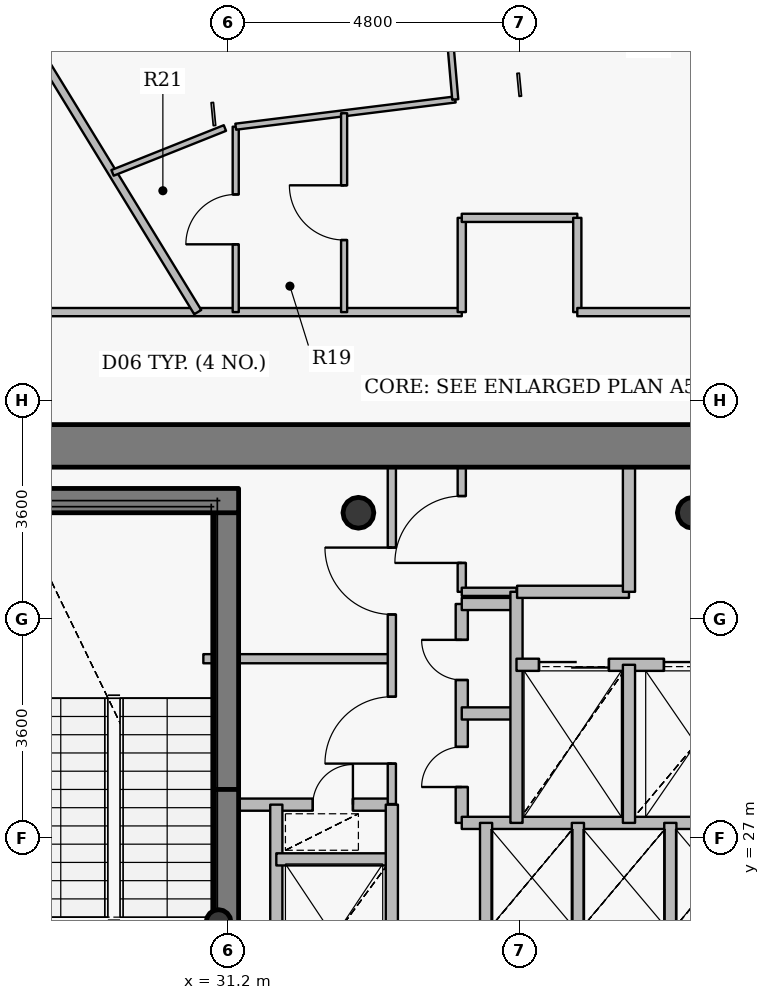
"""IFC4 building model, lengths in metres.
Left out: names, types, materials, properties, quantities, classifications, styles, units other than length and angle.
Written with IfcOpenShell. Run it as: python <this file> out.ifc"""

import sys

from ifc_helpers import new_model, si_unit, direction, frame, frame_2d, origin, origin_2d, place, context, subcontext, project, spatial, rectangle, hollow_circle, extrude, source, transform, mapped, element, fill, save


model = new_model("IFC4")
c1 = context("Model", 3, precision=1e-05, world=origin(), true_north=direction((0.0, 1.0)))
c2 = subcontext(c1, "Body", "Model", "MODEL_VIEW")
j1 = project(units=[si_unit("LENGTHUNIT", "METRE"), si_unit("PLANEANGLEUNIT", "RADIAN")], contexts=[c1])
p1 = place(None, origin())
s1 = spatial("IfcSite", under=j1, at=p1, CompositionType="ELEMENT")
p2 = place(p1, origin())
s2 = spatial("IfcBuilding", under=s1, at=p2, CompositionType="ELEMENT")
p3 = place(p2, frame((0.0, 0.0, 288.0)))
s3 = spatial("IfcBuildingStorey", under=s2, at=p3, CompositionType="ELEMENT", Elevation=288.0)
for number, where, z_axis, x_axis in (
    (1, (38.85, 32.35, 0.0), (0.0, 0.0, 1.0), (1.0, 0.0, 0.0)),
    (2, (33.35, 32.35, 0.0), (0.0, 0.0, 1.0), (1.0, 0.0, 0.0)),
):
    element("IfcColumn", number, at=place(p3, frame(where, z_axis=z_axis, x_axis=x_axis)), inside=s3, PredefinedType="COLUMN", context=c2, shape_type="SweptSolid", body=[
        extrude(hollow_circle(Radius=0.254, WallThickness=0.02, at=origin_2d()), origin(), (0.0, 0.0, 1.0), 3.75),
    ])
p4 = place(p3, frame((31.18, 27.8, 0.0), z_axis=(0.0, 0.0, 1.0), x_axis=(0.0, 1.0, 0.0)))
e3 = element("IfcWall", 3, at=p4, inside=s3, PredefinedType="SHEAR", context=c2, shape_type="SweptSolid", body=[
    extrude(rectangle(XDim=4.75, YDim=0.4, at=frame_2d((2.375, 0.0))), origin(), (0.0, 0.0, 1.0), 3.75),
])
p5 = place(p3, frame((27.25, 32.55, 0.0), z_axis=(0.0, 0.0, 1.0), x_axis=(1.0, 0.0, 0.0)))
e4 = element("IfcWall", 4, at=p5, inside=s3, PredefinedType="SHEAR", context=c2, shape_type="SweptSolid", body=[
    extrude(rectangle(XDim=4.13, YDim=0.4, at=frame_2d((2.065, 0.0))), origin(), (0.0, 0.0, 1.0), 3.75),
])
p6 = place(p3, frame((31.05, 25.62, 0.0), z_axis=(0.0, 0.0, 1.0), x_axis=(1.0, 0.0, 0.0)))
e5 = element("IfcColumn", 5, at=p6, inside=s3, PredefinedType="COLUMN", context=c2, shape_type="SweptSolid", body=[
    extrude(hollow_circle(Radius=0.203, WallThickness=0.016, at=origin_2d()), origin(), (0.0, 0.0, 1.0), 3.75),
])
p7 = place(p3, frame((27.65, 33.45, 0.0), z_axis=(0.0, 0.0, 1.0), x_axis=(1.0, 0.0, 0.0)))
e6 = element("IfcWall", 6, at=p7, inside=s3, PredefinedType="SHEAR", context=c2, shape_type="SweptSolid", body=[
    extrude(rectangle(XDim=16.7, YDim=0.7, at=frame_2d((8.35, 0.0))), origin(), (0.0, 0.0, 1.0), 3.05),
])
p8 = place(p7, frame((12.775, 0.0, 0.0)))
e7 = element("IfcOpeningElement", 7, at=p8, cuts=e6, PredefinedType="OPENING", context=c2, shape_type="SweptSolid", body=[
    extrude(rectangle(XDim=1.15, YDim=2.15, at=origin_2d()), frame((0.575, 0.36, 1.075), z_axis=(0.0, -1.0, 0.0), x_axis=(1.0, 0.0, 0.0)), (0.0, 0.0, 1.0), 0.72),
])
p9 = place(p3, frame((31.18, 25.55, 0.0), z_axis=(0.0, 0.0, 1.0), x_axis=(0.0, 1.0, 0.0)))
e8 = element("IfcWall", 8, at=p9, inside=s3, PredefinedType="SHEAR", context=c2, shape_type="SweptSolid", body=[
    extrude(rectangle(XDim=2.25, YDim=0.4, at=frame_2d((1.125, 0.0))), origin(), (0.0, 0.0, 1.0), 3.1),
])
p10 = place(p3, frame((24.95, 35.65, 0.0), z_axis=(0.0, 0.0, 1.0), x_axis=(1.0, 0.0, 0.0)))
e9 = element("IfcWall", 9, at=p10, inside=s3, PredefinedType="PARTITIONING", context=c2, shape_type="SweptSolid", body=[
    extrude(rectangle(XDim=10.1, YDim=0.135, at=frame_2d((5.05, 0.0))), origin(), (0.0, 0.0, 1.0), 3.035),
])
p11 = place(p3, frame((26.402, 42.688, 0.0), z_axis=(0.0, 0.0, 1.0), x_axis=(0.521891606098, -0.853011812043, 0.0)))
e10 = element("IfcWall", 10, at=p11, inside=s3, PredefinedType="PARTITIONING", context=c2, shape_type="SweptSolid", body=[
    extrude(rectangle(XDim=8.25, YDim=0.135, at=frame_2d((4.125, 0.0))), origin(), (0.0, 0.0, 1.0), 2.985),
])
p12 = place(p3, frame((29.307, 37.94, 0.0), z_axis=(0.0, 0.0, 1.0), x_axis=(0.928797929692, 0.370586569913, 0.0)))
e11 = element("IfcWall", 11, at=p12, inside=s3, PredefinedType="PARTITIONING", context=c2, shape_type="SweptSolid", body=[
    extrude(rectangle(XDim=1.99, YDim=0.1, at=frame_2d((0.995, 0.0))), origin(), (0.0, 0.0, 1.0), 3.035),
])
p13 = place(p3, frame((30.8, 29.95, 0.0), z_axis=(0.0, 0.0, 1.0), x_axis=(1.0, 0.0, 0.0)))
e12 = element("IfcWall", 12, at=p13, inside=s3, PredefinedType="PARTITIONING", context=c2, shape_type="SweptSolid", body=[
    extrude(rectangle(XDim=3.1, YDim=0.15, at=frame_2d((1.55, 0.0))), origin(), (0.0, 0.0, 1.0), 3.085),
])
p14 = place(p3, frame((31.1, 27.55, 0.0), z_axis=(0.0, 0.0, 1.0), x_axis=(1.0, 0.0, 0.0)))
e13 = element("IfcWall", 13, at=p14, inside=s3, PredefinedType="PARTITIONING", context=c2, shape_type="SweptSolid", body=[
    extrude(rectangle(XDim=2.8, YDim=0.2, at=frame_2d((1.4, 0.0))), origin(), (0.0, 0.0, 1.0), 3.085),
])
p15 = place(p14, frame((1.5, 0.0, 0.0)))
e14 = element("IfcOpeningElement", 14, at=p15, cuts=e13, PredefinedType="OPENING", context=c2, shape_type="SweptSolid", body=[
    extrude(rectangle(XDim=0.66, YDim=2.05, at=origin_2d()), frame((0.33, 0.11, 1.025), z_axis=(0.0, -1.0, 0.0), x_axis=(1.0, 0.0, 0.0)), (0.0, 0.0, 1.0), 0.22),
])
p16 = place(p3, frame((31.333, 35.65, 0.0), z_axis=(0.0, 0.0, 1.0), x_axis=(0.0, 1.0, 0.0)))
e15 = element("IfcWall", 15, at=p16, inside=s3, PredefinedType="PARTITIONING", context=c2, shape_type="SweptSolid", body=[
    extrude(rectangle(XDim=3.049, YDim=0.1, at=frame_2d((1.525, 0.0))), origin(), (0.0, 0.0, 1.0), 3.035),
])
p17 = place(p16, frame((1.115, 0.0, 0.0)))
e16 = element("IfcOpeningElement", 16, at=p17, cuts=e15, PredefinedType="OPENING", context=c2, shape_type="SweptSolid", body=[
    extrude(rectangle(XDim=0.82, YDim=2.1, at=origin_2d()), frame((0.41, 0.06, 1.05), z_axis=(0.0, -1.0, 0.0), x_axis=(1.0, 0.0, 0.0)), (0.0, 0.0, 1.0), 0.12),
])
p18 = place(p3, frame((31.333, 38.699, 0.0), z_axis=(0.0, 0.0, 1.0), x_axis=(0.992398193069, 0.123068380965, 0.0)))
e17 = element("IfcWall", 17, at=p18, inside=s3, PredefinedType="PARTITIONING", context=c2, shape_type="SweptSolid", body=[
    extrude(rectangle(XDim=3.638, YDim=0.1, at=frame_2d((1.819, 0.0))), origin(), (0.0, 0.0, 1.0), 2.985),
])
p19 = place(p3, frame((32.0, 24.1, 0.0), z_axis=(0.0, 0.0, 1.0), x_axis=(0.0, 1.0, 0.0)))
e18 = element("IfcWall", 18, at=p19, inside=s3, PredefinedType="PARTITIONING", context=c2, shape_type="SweptSolid", body=[
    extrude(rectangle(XDim=3.45, YDim=0.2, at=frame_2d((1.725, 0.0))), origin(), (0.0, 0.0, 1.0), 3.5),
])
p20 = place(p3, frame((32.0, 26.65, 0.0), z_axis=(0.0, 0.0, 1.0), x_axis=(1.0, 0.0, 0.0)))
e19 = element("IfcWall", 19, at=p20, inside=s3, PredefinedType="PARTITIONING", context=c2, shape_type="SweptSolid", body=[
    extrude(rectangle(XDim=1.9, YDim=0.2, at=frame_2d((0.95, 0.0))), origin(), (0.0, 0.0, 1.0), 3.085),
])
p21 = place(p3, frame((33.115, 35.65, 0.0), z_axis=(0.0, 0.0, 1.0), x_axis=(0.0, 1.0, 0.0)))
e20 = element("IfcWall", 20, at=p21, inside=s3, PredefinedType="PARTITIONING", context=c2, shape_type="SweptSolid", body=[
    extrude(rectangle(XDim=3.27, YDim=0.1, at=frame_2d((1.635, 0.0))), origin(), (0.0, 0.0, 1.0), 3.5),
])
p22 = place(p21, frame((1.185, 0.0, 0.0)))
e21 = element("IfcOpeningElement", 21, at=p22, cuts=e20, PredefinedType="OPENING", context=c2, shape_type="SweptSolid", body=[
    extrude(rectangle(XDim=0.9, YDim=2.1, at=origin_2d()), frame((0.45, 0.06, 1.05), z_axis=(0.0, -1.0, 0.0), x_axis=(1.0, 0.0, 0.0)), (0.0, 0.0, 1.0), 0.12),
])
p23 = place(p3, frame((33.9, 20.9, 0.0), z_axis=(0.0, 0.0, 1.0), x_axis=(0.0, 1.0, 0.0)))
e22 = element("IfcWall", 22, at=p23, inside=s3, PredefinedType="PARTITIONING", context=c2, shape_type="SweptSolid", body=[
    extrude(rectangle(XDim=6.65, YDim=0.2, at=frame_2d((3.325, 0.0))), origin(), (0.0, 0.0, 1.0), 3.085),
])
p24 = place(p3, frame((33.9, 27.56, 0.0), z_axis=(0.0, 0.0, 1.0), x_axis=(0.0, 1.0, 0.0)))
e23 = element("IfcWall", 23, at=p24, inside=s3, PredefinedType="PARTITIONING", context=c2, shape_type="SweptSolid", body=[
    extrude(rectangle(XDim=5.54, YDim=0.135, at=frame_2d((2.77, 0.0))), origin(), (0.0, 0.0, 1.0), 3.085),
])
p25 = place(p24, frame((0.665, 0.0, 0.0)))
e24 = element("IfcOpeningElement", 24, at=p25, cuts=e23, PredefinedType="OPENING", context=c2, shape_type="SweptSolid", body=[
    extrude(rectangle(XDim=1.1, YDim=2.15, at=origin_2d()), frame((0.55, 0.078, 1.075), z_axis=(0.0, -1.0, 0.0), x_axis=(1.0, 0.0, 0.0)), (0.0, 0.0, 1.0), 0.155),
])
p26 = place(p24, frame((3.117, 0.0, 0.0)))
e25 = element("IfcOpeningElement", 25, at=p26, cuts=e23, PredefinedType="OPENING", context=c2, shape_type="SweptSolid", body=[
    extrude(rectangle(XDim=1.1, YDim=2.15, at=origin_2d()), frame((0.55, 0.078, 1.075), z_axis=(0.0, -1.0, 0.0), x_axis=(1.0, 0.0, 0.0)), (0.0, 0.0, 1.0), 0.155),
])
p27 = place(p3, frame((34.492, 44.327, 0.0), z_axis=(0.0, 0.0, 1.0), x_axis=(0.086674190257, -0.9962367112, 0.0)))
e26 = element("IfcWall", 26, at=p27, inside=s3, PredefinedType="PARTITIONING", context=c2, shape_type="SweptSolid", body=[
    extrude(rectangle(XDim=5.2, YDim=0.1, at=frame_2d((2.6, 0.0))), origin(), (0.0, 0.0, 1.0), 2.985),
])
p28 = place(p27, frame((2.15, 0.0, 0.0)))
e27 = element("IfcOpeningElement", 27, at=p28, cuts=e26, PredefinedType="OPENING", context=c2, shape_type="SweptSolid", body=[
    extrude(rectangle(XDim=0.9, YDim=2.1, at=origin_2d()), frame((0.45, 0.06, 1.05), z_axis=(0.0, -1.0, 0.0), x_axis=(1.0, 0.0, 0.0)), (0.0, 0.0, 1.0), 0.12),
])
p29 = place(p3, frame((35.05, 27.25, 0.0), z_axis=(0.0, 0.0, 1.0), x_axis=(0.0, 1.0, 0.0)))
e28 = element("IfcWall", 28, at=p29, inside=s3, PredefinedType="PARTITIONING", context=c2, shape_type="SweptSolid", body=[
    extrude(rectangle(XDim=3.6, YDim=0.2, at=frame_2d((1.8, 0.0))), origin(), (0.0, 0.0, 1.0), 3.5),
])
p30 = place(p29, frame((0.59, 0.0, 0.0)))
e29 = element("IfcOpeningElement", 29, at=p30, cuts=e28, PredefinedType="OPENING", context=c2, shape_type="SweptSolid", body=[
    extrude(rectangle(XDim=0.66, YDim=2.05, at=origin_2d()), frame((0.33, 0.11, 1.025), z_axis=(0.0, -1.0, 0.0), x_axis=(1.0, 0.0, 0.0)), (0.0, 0.0, 1.0), 0.22),
])
p31 = place(p29, frame((2.35, 0.0, 0.0)))
e30 = element("IfcOpeningElement", 30, at=p31, cuts=e28, PredefinedType="OPENING", context=c2, shape_type="SweptSolid", body=[
    extrude(rectangle(XDim=0.66, YDim=2.05, at=origin_2d()), frame((0.33, 0.11, 1.025), z_axis=(0.0, -1.0, 0.0), x_axis=(1.0, 0.0, 0.0)), (0.0, 0.0, 1.0), 0.22),
])
p32 = place(p3, frame((35.05, 27.25, 0.0), z_axis=(0.0, 0.0, 1.0), x_axis=(1.0, 0.0, 0.0)))
e31 = element("IfcWall", 31, at=p32, inside=s3, PredefinedType="PARTITIONING", context=c2, shape_type="SweptSolid", body=[
    extrude(rectangle(XDim=4.95, YDim=0.2, at=frame_2d((2.475, 0.0))), origin(), (0.0, 0.0, 1.0), 3.085),
])
for number, where, z_axis, x_axis in (
    (32, (35.05, 29.05, 0.0), (0.0, 0.0, 1.0), (1.0, 0.0, 0.0)),
    (33, (35.05, 30.85, 0.0), (0.0, 0.0, 1.0), (1.0, 0.0, 0.0)),
):
    element("IfcWall", number, at=place(p3, frame(where, z_axis=z_axis, x_axis=x_axis)), inside=s3, PredefinedType="PARTITIONING", context=c2, shape_type="SweptSolid", body=[
        extrude(rectangle(XDim=0.9, YDim=0.2, at=frame_2d((0.45, 0.0))), origin(), (0.0, 0.0, 1.0), 3.5),
    ])
p33 = place(p3, frame((35.05, 31.05, 0.0), z_axis=(0.0, 0.0, 1.0), x_axis=(0.0, 1.0, 0.0)))
e34 = element("IfcWall", 34, at=p33, inside=s3, PredefinedType="PARTITIONING", context=c2, shape_type="SweptSolid", body=[
    extrude(rectangle(XDim=2.05, YDim=0.135, at=frame_2d((1.025, 0.0))), origin(), (0.0, 0.0, 1.0), 3.085),
])
p34 = place(p33, frame((0.475, 0.0, 0.0)))
e35 = element("IfcOpeningElement", 35, at=p34, cuts=e34, PredefinedType="OPENING", context=c2, shape_type="SweptSolid", body=[
    extrude(rectangle(XDim=1.1, YDim=2.15, at=origin_2d()), frame((0.55, 0.078, 1.075), z_axis=(0.0, -1.0, 0.0), x_axis=(1.0, 0.0, 0.0)), (0.0, 0.0, 1.0), 0.155),
])
p35 = place(p3, frame((35.05, 31.05, 0.0), z_axis=(0.0, 0.0, 1.0), x_axis=(1.0, 0.0, 0.0)))
e36 = element("IfcWall", 36, at=p35, inside=s3, PredefinedType="PARTITIONING", context=c2, shape_type="SweptSolid", body=[
    extrude(rectangle(XDim=0.9, YDim=0.135, at=frame_2d((0.45, 0.0))), origin(), (0.0, 0.0, 1.0), 3.5),
])
p36 = place(p3, frame((35.05, 35.65, 0.0), z_axis=(0.0, 0.0, 1.0), x_axis=(0.0, 1.0, 0.0)))
e37 = element("IfcWall", 37, at=p36, inside=s3, PredefinedType="PARTITIONING", context=c2, shape_type="SweptSolid", body=[
    extrude(rectangle(XDim=1.55, YDim=0.135, at=frame_2d((0.775, 0.0))), origin(), (0.0, 0.0, 1.0), 3.5),
])
p37 = place(p3, frame((35.05, 37.2, 0.0), z_axis=(0.0, 0.0, 1.0), x_axis=(1.0, 0.0, 0.0)))
e38 = element("IfcWall", 38, at=p37, inside=s3, PredefinedType="PARTITIONING", context=c2, shape_type="SweptSolid", body=[
    extrude(rectangle(XDim=1.9, YDim=0.135, at=frame_2d((0.95, 0.0))), origin(), (0.0, 0.0, 1.0), 3.035),
])
p38 = place(p3, frame((35.45, 25.45, 0.0), z_axis=(0.0, 0.0, 1.0), x_axis=(0.0, 1.0, 0.0)))
e39 = element("IfcWall", 39, at=p38, inside=s3, PredefinedType="PARTITIONING", context=c2, shape_type="SweptSolid", body=[
    extrude(rectangle(XDim=1.8, YDim=0.2, at=frame_2d((0.9, 0.0))), origin(), (0.0, 0.0, 1.0), 3.5),
])
p39 = place(p3, frame((35.95, 27.25, 0.0), z_axis=(0.0, 0.0, 1.0), x_axis=(0.0, 1.0, 0.0)))
e40 = element("IfcWall", 40, at=p39, inside=s3, PredefinedType="PARTITIONING", context=c2, shape_type="SweptSolid", body=[
    extrude(rectangle(XDim=3.8, YDim=0.2, at=frame_2d((1.9, 0.0))), origin(), (0.0, 0.0, 1.0), 3.5),
])
p40 = place(p3, frame((35.95, 29.85, 0.0), z_axis=(0.0, 0.0, 1.0), x_axis=(1.0, 0.0, 0.0)))
e41 = element("IfcWall", 41, at=p40, inside=s3, PredefinedType="PARTITIONING", context=c2, shape_type="SweptSolid", body=[
    extrude(rectangle(XDim=8.49, YDim=0.2, at=frame_2d((4.245, 0.0))), origin(), (0.0, 0.0, 1.0), 3.085),
])
p41 = place(p40, frame((6.1, 0.0, 0.0)))
e42 = element("IfcOpeningElement", 42, at=p41, cuts=e41, PredefinedType="OPENING", context=c2, shape_type="SweptSolid", body=[
    extrude(rectangle(XDim=1.2, YDim=2.15, at=origin_2d()), frame((0.6, 0.11, 1.075), z_axis=(0.0, -1.0, 0.0), x_axis=(1.0, 0.0, 0.0)), (0.0, 0.0, 1.0), 0.22),
])
p42 = place(p40, frame((0.37, 0.0, 0.0)))
e43 = element("IfcOpeningElement", 43, at=p42, cuts=e41, PredefinedType="OPENING", context=c2, shape_type="SweptSolid", body=[
    extrude(rectangle(XDim=1.15, YDim=2.15, at=origin_2d()), frame((0.575, 0.11, 1.075), z_axis=(0.0, -1.0, 0.0), x_axis=(1.0, 0.0, 0.0)), (0.0, 0.0, 1.0), 0.22),
])
p43 = place(p40, frame((2.425, 0.0, 0.0)))
e44 = element("IfcOpeningElement", 44, at=p43, cuts=e41, PredefinedType="OPENING", context=c2, shape_type="SweptSolid", body=[
    extrude(rectangle(XDim=1.05, YDim=2.15, at=origin_2d()), frame((0.525, 0.11, 1.075), z_axis=(0.0, -1.0, 0.0), x_axis=(1.0, 0.0, 0.0)), (0.0, 0.0, 1.0), 0.22),
])
p44 = place(p3, frame((35.96, 31.05, 0.0), z_axis=(0.0, 0.0, 1.0), x_axis=(1.0, 0.0, 0.0)))
e45 = element("IfcWall", 45, at=p44, inside=s3, PredefinedType="PARTITIONING", context=c2, shape_type="SweptSolid", body=[
    extrude(rectangle(XDim=1.84, YDim=0.2, at=frame_2d((0.92, 0.0))), origin(), (0.0, 0.0, 1.0), 3.5),
])
p45 = place(p3, frame((36.95, 35.65, 0.0), z_axis=(0.0, 0.0, 1.0), x_axis=(0.0, 1.0, 0.0)))
e46 = element("IfcWall", 46, at=p45, inside=s3, PredefinedType="PARTITIONING", context=c2, shape_type="SweptSolid", body=[
    extrude(rectangle(XDim=1.55, YDim=0.135, at=frame_2d((0.775, 0.0))), origin(), (0.0, 0.0, 1.0), 3.5),
])
p46 = place(p3, frame((36.95, 35.65, 0.0), z_axis=(0.0, 0.0, 1.0), x_axis=(1.0, 0.0, 0.0)))
e47 = element("IfcWall", 47, at=p46, inside=s3, PredefinedType="PARTITIONING", context=c2, shape_type="SweptSolid", body=[
    extrude(rectangle(XDim=10.1, YDim=0.135, at=frame_2d((5.05, 0.0))), origin(), (0.0, 0.0, 1.0), 3.035),
])
p47 = place(p46, frame((3.848, 0.0, 0.0)))
e48 = element("IfcOpeningElement", 48, at=p47, cuts=e47, PredefinedType="OPENING", context=c2, shape_type="SweptSolid", body=[
    extrude(rectangle(XDim=1.0, YDim=2.15, at=origin_2d()), frame((0.5, 0.078, 1.075), z_axis=(0.0, -1.0, 0.0), x_axis=(1.0, 0.0, 0.0)), (0.0, 0.0, 1.0), 0.155),
])
p48 = place(p3, frame((36.96, 25.45, 0.0), z_axis=(0.0, 0.0, 1.0), x_axis=(0.0, 1.0, 0.0)))
e49 = element("IfcWall", 49, at=p48, inside=s3, PredefinedType="PARTITIONING", context=c2, shape_type="SweptSolid", body=[
    extrude(rectangle(XDim=1.8, YDim=0.2, at=frame_2d((0.9, 0.0))), origin(), (0.0, 0.0, 1.0), 3.5),
])
p49 = place(p3, frame((37.8, 27.25, 0.0), z_axis=(0.0, 0.0, 1.0), x_axis=(0.0, 1.0, 0.0)))
e50 = element("IfcWall", 50, at=p49, inside=s3, PredefinedType="PARTITIONING", context=c2, shape_type="SweptSolid", body=[
    extrude(rectangle(XDim=2.6, YDim=0.2, at=frame_2d((1.3, 0.0))), origin(), (0.0, 0.0, 1.0), 3.5),
])
p50 = place(p3, frame((37.8, 31.05, 0.0), z_axis=(0.0, 0.0, 1.0), x_axis=(0.0, 1.0, 0.0)))
e51 = element("IfcWall", 51, at=p50, inside=s3, PredefinedType="PARTITIONING", context=c2, shape_type="SweptSolid", body=[
    extrude(rectangle(XDim=2.05, YDim=0.2, at=frame_2d((1.025, 0.0))), origin(), (0.0, 0.0, 1.0), 3.085),
])
p51 = place(p3, frame((38.48, 25.45, 0.0), z_axis=(0.0, 0.0, 1.0), x_axis=(0.0, 1.0, 0.0)))
e52 = element("IfcWall", 52, at=p51, inside=s3, PredefinedType="PARTITIONING", context=c2, shape_type="SweptSolid", body=[
    extrude(rectangle(XDim=1.8, YDim=0.2, at=frame_2d((0.9, 0.0))), origin(), (0.0, 0.0, 1.0), 3.5),
])
m1 = source(origin(), c2, "Body", "SweptSolid", [
    extrude(rectangle(XDim=1.15, YDim=2.15, at=origin_2d()), frame((0.575, 0.025, 1.075), z_axis=(0.0, -1.0, 0.0), x_axis=(1.0, 0.0, 0.0)), (0.0, 0.0, 1.0), 0.05),
])
p52 = place(p42, origin())
e53 = element("IfcDoor", 53, at=p52, inside=s3, OperationType="DOUBLE_DOOR_SLIDING", PredefinedType="USERDEFINED", context=c2, shape_type="MappedRepresentation", body=[
    mapped(m1, transform((0.0, 0.0, 0.0), x_axis=(1.0, 0.0, 0.0), y_axis=(0.0, 1.0, 0.0), z_axis=(0.0, 0.0, 1.0), scale=1.0)),
])
fill(e43, e53)
m2 = source(origin(), c2, "Body", "SweptSolid", [
    extrude(rectangle(XDim=1.05, YDim=2.15, at=origin_2d()), frame((0.525, 0.025, 1.075), z_axis=(0.0, -1.0, 0.0), x_axis=(1.0, 0.0, 0.0)), (0.0, 0.0, 1.0), 0.05),
])
p53 = place(p43, origin())
e54 = element("IfcDoor", 54, at=p53, inside=s3, OperationType="DOUBLE_DOOR_SLIDING", PredefinedType="USERDEFINED", context=c2, shape_type="MappedRepresentation", body=[
    mapped(m2, transform((0.0, 0.0, 0.0), x_axis=(1.0, 0.0, 0.0), y_axis=(0.0, 1.0, 0.0), z_axis=(0.0, 0.0, 1.0), scale=1.0)),
])
fill(e44, e54)
m3 = source(origin(), c2, "Body", "SweptSolid", [
    extrude(rectangle(XDim=0.9, YDim=2.1, at=origin_2d()), frame((0.45, 0.025, 1.05), z_axis=(0.0, -1.0, 0.0), x_axis=(1.0, 0.0, 0.0)), (0.0, 0.0, 1.0), 0.05),
])
p54 = place(p22, origin())
e55 = element("IfcDoor", 55, at=p54, inside=s3, OperationType="SINGLE_SWING_RIGHT", PredefinedType="DOOR", context=c2, shape_type="MappedRepresentation", body=[
    mapped(m3, transform((0.0, 0.0, 0.0), x_axis=(1.0, 0.0, 0.0), y_axis=(0.0, 1.0, 0.0), z_axis=(0.0, 0.0, 1.0), scale=1.0)),
])
fill(e21, e55)
m4 = source(origin(), c2, "Body", "SweptSolid", [
    extrude(rectangle(XDim=0.82, YDim=2.1, at=origin_2d()), frame((0.41, 0.025, 1.05), z_axis=(0.0, -1.0, 0.0), x_axis=(1.0, 0.0, 0.0)), (0.0, 0.0, 1.0), 0.05),
])
p55 = place(p17, origin())
e56 = element("IfcDoor", 56, at=p55, inside=s3, OperationType="SINGLE_SWING_LEFT", PredefinedType="DOOR", context=c2, shape_type="MappedRepresentation", body=[
    mapped(m4, transform((0.0, 0.0, 0.0), x_axis=(1.0, 0.0, 0.0), y_axis=(0.0, 1.0, 0.0), z_axis=(0.0, 0.0, 1.0), scale=1.0)),
])
fill(e16, e56)
m5 = source(origin(), c2, "Body", "SweptSolid", [
    extrude(rectangle(XDim=0.66, YDim=2.05, at=origin_2d()), frame((0.33, 0.025, 1.025), z_axis=(0.0, -1.0, 0.0), x_axis=(1.0, 0.0, 0.0)), (0.0, 0.0, 1.0), 0.05),
])
p56 = place(p30, origin())
e57 = element("IfcDoor", 57, at=p56, inside=s3, OperationType="SINGLE_SWING_LEFT", PredefinedType="USERDEFINED", context=c2, shape_type="MappedRepresentation", body=[
    mapped(m5, transform((0.0, 0.0, 0.0), x_axis=(1.0, 0.0, 0.0), y_axis=(0.0, 1.0, 0.0), z_axis=(0.0, 0.0, 1.0), scale=1.0)),
])
fill(e29, e57)
p57 = place(p31, origin())
e58 = element("IfcDoor", 58, at=p57, inside=s3, OperationType="SINGLE_SWING_RIGHT", PredefinedType="USERDEFINED", context=c2, shape_type="MappedRepresentation", body=[
    mapped(m5, transform((0.0, 0.0, 0.0), x_axis=(1.0, 0.0, 0.0), y_axis=(0.0, 1.0, 0.0), z_axis=(0.0, 0.0, 1.0), scale=1.0)),
])
fill(e30, e58)
m6 = source(origin(), c2, "Body", "SweptSolid", [
    extrude(rectangle(XDim=1.1, YDim=2.15, at=origin_2d()), frame((0.55, 0.025, 1.075), z_axis=(0.0, -1.0, 0.0), x_axis=(1.0, 0.0, 0.0)), (0.0, 0.0, 1.0), 0.05),
])
p58 = place(p25, origin())
e59 = element("IfcDoor", 59, at=p58, inside=s3, OperationType="SINGLE_SWING_LEFT", PredefinedType="DOOR", context=c2, shape_type="MappedRepresentation", body=[
    mapped(m6, transform((0.0, 0.0, 0.0), x_axis=(1.0, 0.0, 0.0), y_axis=(0.0, 1.0, 0.0), z_axis=(0.0, 0.0, 1.0), scale=1.0)),
])
fill(e24, e59)
p59 = place(p26, origin())
e60 = element("IfcDoor", 60, at=p59, inside=s3, OperationType="SINGLE_SWING_RIGHT", PredefinedType="DOOR", context=c2, shape_type="MappedRepresentation", body=[
    mapped(m6, transform((0.0, 0.0, 0.0), x_axis=(1.0, 0.0, 0.0), y_axis=(0.0, 1.0, 0.0), z_axis=(0.0, 0.0, 1.0), scale=1.0)),
])
fill(e25, e60)
p60 = place(p34, origin())
e61 = element("IfcDoor", 61, at=p60, inside=s3, OperationType="SINGLE_SWING_LEFT", PredefinedType="DOOR", context=c2, shape_type="MappedRepresentation", body=[
    mapped(m6, transform((0.0, 0.0, 0.0), x_axis=(1.0, 0.0, 0.0), y_axis=(0.0, 1.0, 0.0), z_axis=(0.0, 0.0, 1.0), scale=1.0)),
])
fill(e35, e61)
p61 = place(p15, origin())
e62 = element("IfcDoor", 62, at=p61, inside=s3, OperationType="SINGLE_SWING_RIGHT", PredefinedType="USERDEFINED", context=c2, shape_type="MappedRepresentation", body=[
    mapped(m5, transform((0.0, 0.0, 0.0), x_axis=(1.0, 0.0, 0.0), y_axis=(0.0, 1.0, 0.0), z_axis=(0.0, 0.0, 1.0), scale=1.0)),
])
fill(e14, e62)
save(model, sys.argv[1])
